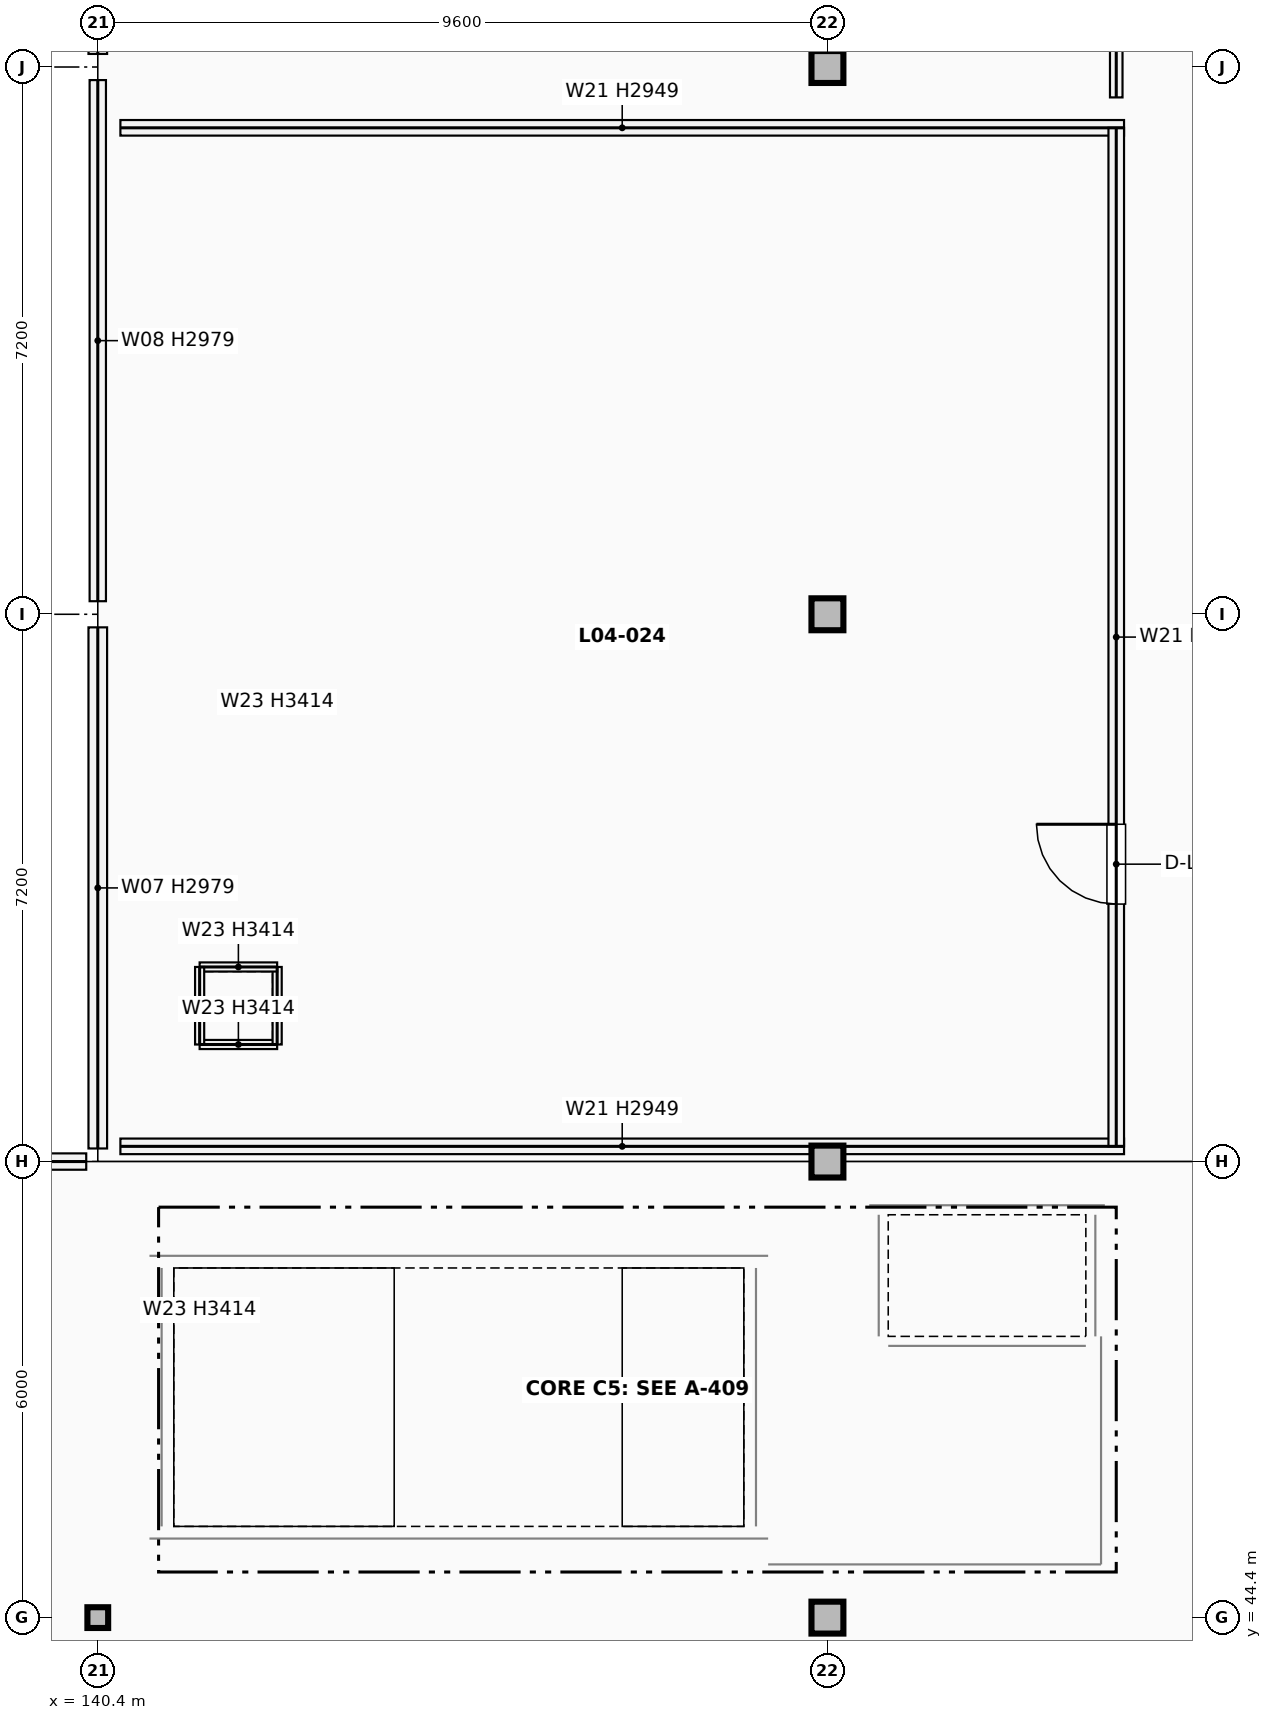
"""IFC4 building model, lengths in metres.
Left out: names, types, materials, properties, quantities, classifications, styles, units other than length and angle.
Written with IfcOpenShell. Run it as: python <this file> out.ifc"""

import sys

from ifc_helpers import new_model, si_unit, direction, frame, frame_2d, origin, origin_2d, place, context, subcontext, project, spatial, rectangle, hollow_circle, extrude, element, fill, save


model = new_model("IFC4")
c1 = context("Model", 3, precision=1e-05, world=origin(), true_north=direction((0.0, 1.0)))
c2 = subcontext(c1, "Body", "Model", "MODEL_VIEW")
j1 = project(units=[si_unit("LENGTHUNIT", "METRE"), si_unit("PLANEANGLEUNIT", "RADIAN")], contexts=[c1])
p1 = place(None, origin())
s1 = spatial("IfcSite", under=j1, at=p1, CompositionType="ELEMENT")
p2 = place(p1, origin())
s2 = spatial("IfcBuilding", under=s1, at=p2, CompositionType="ELEMENT")
p3 = place(p2, frame((0.0, 0.0, 17.34)))
s3 = spatial("IfcBuildingStorey", under=s2, at=p3, CompositionType="ELEMENT", Elevation=17.34)
p4 = place(p3, frame((140.4, 44.4, 0.0), z_axis=(0.0, 0.0, 1.0), x_axis=(1.0, 0.0, 0.0)))
e1 = element("IfcColumn", 1, at=p4, inside=s3, PredefinedType="COLUMN", context=c2, shape_type="SweptSolid", body=[
    extrude(hollow_circle(Radius=0.136, WallThickness=0.012, at=origin_2d()), origin(), (0.0, 0.0, 1.0), 3.7),
])
for number, where, z_axis, x_axis in (
    (2, (150.0, 44.4, 0.0), (0.0, 0.0, 1.0), (1.0, 0.0, 0.0)),
    (3, (150.0, 50.4, 0.0), (0.0, 0.0, 1.0), (1.0, 0.0, 0.0)),
    (4, (150.0, 57.6, 0.0), (0.0, 0.0, 1.0), (1.0, 0.0, 0.0)),
    (5, (150.0, 64.8, 0.0), (0.0, 0.0, 1.0), (1.0, 0.0, 0.0)),
):
    element("IfcColumn", number, at=place(p3, frame(where, z_axis=z_axis, x_axis=x_axis)), inside=s3, PredefinedType="COLUMN", context=c2, shape_type="SweptSolid", body=[
        extrude(rectangle(XDim=0.42, YDim=0.42, at=origin_2d()), origin(), (0.0, 0.0, 1.0), 3.74),
    ])
p5 = place(p3, frame((131.012, 50.4, 0.0), z_axis=(0.0, 0.0, 1.0), x_axis=(1.0, 0.0, 0.0)))
e6 = element("IfcWall", 6, at=p5, inside=s3, PredefinedType="SOLIDWALL", context=c2, shape_type="SweptSolid", body=[
    extrude(rectangle(XDim=9.236, YDim=0.215, at=frame_2d((4.618, 0.0))), origin(), (0.0, 0.0, 1.0), 2.979),
])
p6 = place(p5, frame((1.967, 0.0, 0.75)))
e7 = element("IfcOpeningElement", 7, at=p6, cuts=e6, PredefinedType="OPENING", context=c2, shape_type="SweptSolid", body=[
    extrude(rectangle(XDim=0.75, YDim=2.1, at=frame_2d((0.375, 1.05))), frame((0.0, 0.118, 0.0), z_axis=(0.0, -1.0, 0.0), x_axis=(1.0, 0.0, 0.0)), (0.0, 0.0, 1.0), 0.235),
])
p7 = place(p5, frame((4.243, 0.0, 0.75)))
e8 = element("IfcOpeningElement", 8, at=p7, cuts=e6, PredefinedType="OPENING", context=c2, shape_type="SweptSolid", body=[
    extrude(rectangle(XDim=0.75, YDim=2.1, at=frame_2d((0.375, 1.05))), frame((0.0, 0.118, 0.0), z_axis=(0.0, -1.0, 0.0), x_axis=(1.0, 0.0, 0.0)), (0.0, 0.0, 1.0), 0.235),
])
p8 = place(p5, frame((6.52, 0.0, 0.75)))
e9 = element("IfcOpeningElement", 9, at=p8, cuts=e6, PredefinedType="OPENING", context=c2, shape_type="SweptSolid", body=[
    extrude(rectangle(XDim=0.75, YDim=2.1, at=frame_2d((0.375, 1.05))), frame((0.0, 0.118, 0.0), z_axis=(0.0, -1.0, 0.0), x_axis=(1.0, 0.0, 0.0)), (0.0, 0.0, 1.0), 0.235),
])
p9 = place(p3, frame((140.4, 50.572, 0.0), z_axis=(0.0, 0.0, 1.0), x_axis=(0.0, 1.0, 0.0)))
e10 = element("IfcWall", 10, at=p9, inside=s3, PredefinedType="SOLIDWALL", context=c2, shape_type="SweptSolid", body=[
    extrude(rectangle(XDim=6.856, YDim=0.245, at=frame_2d((3.428, 0.0))), origin(), (0.0, 0.0, 1.0), 2.979),
])
p10 = place(p3, frame((140.4, 57.772, 0.0), z_axis=(0.0, 0.0, 1.0), x_axis=(0.0, 1.0, 0.0)))
e11 = element("IfcWall", 11, at=p10, inside=s3, PredefinedType="SOLIDWALL", context=c2, shape_type="SweptSolid", body=[
    extrude(rectangle(XDim=6.856, YDim=0.215, at=frame_2d((3.428, 0.0))), origin(), (0.0, 0.0, 1.0), 2.979),
])
p11 = place(p3, frame((140.4, 64.972, 0.0), z_axis=(0.0, 0.0, 1.0), x_axis=(0.0, 1.0, 0.0)))
e12 = element("IfcWall", 12, at=p11, inside=s3, PredefinedType="SOLIDWALL", context=c2, shape_type="SweptSolid", body=[
    extrude(rectangle(XDim=6.856, YDim=0.245, at=frame_2d((3.428, 0.0))), origin(), (0.0, 0.0, 1.0), 2.979),
])
for number, where, z_axis, x_axis in (
    (13, (141.74, 51.94, 0.0), (0.0, 0.0, 1.0), (1.0, 0.0, 0.0)),
    (14, (142.76, 51.94, 0.0), (0.0, 0.0, 1.0), (0.0, 1.0, 0.0)),
    (15, (142.76, 52.96, 0.0), (0.0, 0.0, 1.0), (-1.0, 0.0, 0.0)),
    (16, (141.74, 52.96, 0.0), (0.0, 0.0, 1.0), (0.0, -1.0, 0.0)),
):
    element("IfcWall", number, at=place(p3, frame(where, z_axis=z_axis, x_axis=x_axis)), inside=s3, PredefinedType="PARTITIONING", context=c2, shape_type="SweptSolid", body=[
        extrude(rectangle(XDim=1.02, YDim=0.12, at=frame_2d((0.51, 0.0))), origin(), (0.0, 0.0, 1.0), 3.414),
    ])
p12 = place(p3, frame((141.24, 45.6, 0.0), z_axis=(0.0, 0.0, 1.0), x_axis=(0.0, 1.0, 0.0)))
e17 = element("IfcWall", 17, at=p12, inside=s3, PredefinedType="SHEAR", context=c2, shape_type="SweptSolid", body=[
    extrude(rectangle(XDim=3.4, YDim=0.32, at=frame_2d((1.7, 0.0))), origin(), (0.0, 0.0, 1.0), 3.74),
])
for number, where, z_axis, x_axis in (
    (18, (141.08, 45.44, 0.0), (0.0, 0.0, 1.0), (1.0, 0.0, 0.0)),
    (19, (141.08, 49.16, 0.0), (0.0, 0.0, 1.0), (1.0, 0.0, 0.0)),
):
    element("IfcWall", number, at=place(p3, frame(where, z_axis=z_axis, x_axis=x_axis)), inside=s3, PredefinedType="SHEAR", context=c2, shape_type="SweptSolid", body=[
        extrude(rectangle(XDim=8.14, YDim=0.32, at=frame_2d((4.07, 0.0))), origin(), (0.0, 0.0, 1.0), 3.74),
    ])
p13 = place(p3, frame((149.06, 45.6, 0.0), z_axis=(0.0, 0.0, 1.0), x_axis=(0.0, 1.0, 0.0)))
e20 = element("IfcWall", 20, at=p13, inside=s3, PredefinedType="SHEAR", context=c2, shape_type="SweptSolid", body=[
    extrude(rectangle(XDim=3.4, YDim=0.32, at=frame_2d((1.7, 0.0))), origin(), (0.0, 0.0, 1.0), 3.74),
])
p14 = place(p13, frame((0.65, 0.0, 0.0)))
e21 = element("IfcOpeningElement", 21, at=p14, cuts=e20, PredefinedType="OPENING", context=c2, shape_type="SweptSolid", body=[
    extrude(rectangle(XDim=1.2, YDim=2.2, at=frame_2d((0.6, 1.1))), frame((0.0, 0.17, 0.0), z_axis=(0.0, -1.0, 0.0), x_axis=(1.0, 0.0, 0.0)), (0.0, 0.0, 1.0), 0.34),
])
for number, where, z_axis, x_axis in (
    (22, (150.675, 48.1, 0.0), (0.0, 0.0, 1.0), (0.0, 1.0, 0.0)),
    (23, (153.525, 48.1, 0.0), (0.0, 0.0, 1.0), (0.0, 1.0, 0.0)),
):
    element("IfcWall", number, at=place(p3, frame(where, z_axis=z_axis, x_axis=x_axis)), inside=s3, PredefinedType="SHEAR", context=c2, shape_type="SweptSolid", body=[
        extrude(rectangle(XDim=1.6, YDim=0.25, at=frame_2d((0.8, 0.0))), origin(), (0.0, 0.0, 1.0), 3.74),
    ])
p15 = place(p3, frame((150.55, 49.825, 0.0), z_axis=(0.0, 0.0, 1.0), x_axis=(1.0, 0.0, 0.0)))
e24 = element("IfcWall", 24, at=p15, inside=s3, PredefinedType="SHEAR", context=c2, shape_type="SweptSolid", body=[
    extrude(rectangle(XDim=3.1, YDim=0.25, at=frame_2d((1.55, 0.0))), origin(), (0.0, 0.0, 1.0), 3.74),
])
p16 = place(p3, frame((150.8, 47.975, 0.0), z_axis=(0.0, 0.0, 1.0), x_axis=(1.0, 0.0, 0.0)))
e25 = element("IfcWall", 25, at=p16, inside=s3, PredefinedType="SHEAR", context=c2, shape_type="SweptSolid", body=[
    extrude(rectangle(XDim=2.6, YDim=0.25, at=frame_2d((1.3, 0.0))), origin(), (0.0, 0.0, 1.0), 3.74),
])
p17 = place(p16, frame((0.75, 0.0, 0.0)))
e26 = element("IfcOpeningElement", 26, at=p17, cuts=e25, PredefinedType="OPENING", context=c2, shape_type="SweptSolid", body=[
    extrude(rectangle(XDim=1.1, YDim=2.15, at=frame_2d((0.55, 1.075))), frame((0.0, 0.135, 0.0), z_axis=(0.0, -1.0, 0.0), x_axis=(1.0, 0.0, 0.0)), (0.0, 0.0, 1.0), 0.27),
])
p18 = place(p3, frame((153.6, 45.1, 0.0), z_axis=(0.0, 0.0, 1.0), x_axis=(0.0, 1.0, 0.0)))
e27 = element("IfcWall", 27, at=p18, inside=s3, PredefinedType="PARTITIONING", context=c2, shape_type="SweptSolid", body=[
    extrude(rectangle(XDim=3.0, YDim=0.2, at=frame_2d((1.5, 0.0))), origin(), (0.0, 0.0, 1.0), 2.949),
])
p19 = place(p18, frame((0.775, 0.0, 0.0)))
e28 = element("IfcOpeningElement", 28, at=p19, cuts=e27, PredefinedType="OPENING", context=c2, shape_type="SweptSolid", body=[
    extrude(rectangle(XDim=1.45, YDim=2.2, at=frame_2d((0.725, 1.1))), frame((0.0, 0.11, 0.0), z_axis=(0.0, -1.0, 0.0), x_axis=(1.0, 0.0, 0.0)), (0.0, 0.0, 1.0), 0.22),
])
p20 = place(p3, frame((149.22, 45.1, 0.0), z_axis=(0.0, 0.0, 1.0), x_axis=(1.0, 0.0, 0.0)))
e29 = element("IfcWall", 29, at=p20, inside=s3, PredefinedType="PARTITIONING", context=c2, shape_type="SweptSolid", body=[
    extrude(rectangle(XDim=4.38, YDim=0.2, at=frame_2d((2.19, 0.0))), origin(), (0.0, 0.0, 1.0), 2.949),
])
for number, where, z_axis, x_axis in (
    (30, (140.698, 50.6, 0.0), (0.0, 0.0, 1.0), (1.0, 0.0, 0.0)),
    (31, (140.698, 64.0, 0.0), (0.0, 0.0, 1.0), (1.0, 0.0, 0.0)),
):
    element("IfcWall", number, at=place(p3, frame(where, z_axis=z_axis, x_axis=x_axis)), inside=s3, PredefinedType="PARTITIONING", context=c2, shape_type="SweptSolid", body=[
        extrude(rectangle(XDim=13.205, YDim=0.205, at=frame_2d((6.603, 0.0))), origin(), (0.0, 0.0, 1.0), 2.949),
    ])
p21 = place(p3, frame((153.8, 50.6, 0.0), z_axis=(0.0, 0.0, 1.0), x_axis=(0.0, 1.0, 0.0)))
e32 = element("IfcWall", 32, at=p21, inside=s3, PredefinedType="PARTITIONING", context=c2, shape_type="SweptSolid", body=[
    extrude(rectangle(XDim=13.4, YDim=0.205, at=frame_2d((6.7, 0.0))), origin(), (0.0, 0.0, 1.0), 3.029),
])
p22 = place(p21, frame((3.188, 0.0, 0.0)))
e33 = element("IfcOpeningElement", 33, at=p22, cuts=e32, PredefinedType="OPENING", context=c2, shape_type="SweptSolid", body=[
    extrude(rectangle(XDim=1.05, YDim=2.15, at=frame_2d((0.525, 1.075))), frame((0.0, 0.113, 0.0), z_axis=(0.0, -1.0, 0.0), x_axis=(1.0, 0.0, 0.0)), (0.0, 0.0, 1.0), 0.225),
])
p23 = place(p3, frame((153.8, 64.4, 0.0), z_axis=(0.0, 0.0, 1.0), x_axis=(0.0, 1.0, 0.0)))
e34 = element("IfcWall", 34, at=p23, inside=s3, PredefinedType="PARTITIONING", context=c2, shape_type="SweptSolid", body=[
    extrude(rectangle(XDim=14.6, YDim=0.165, at=frame_2d((7.3, 0.0))), origin(), (0.0, 0.0, 1.0), 3.029),
])
p24 = place(p23, frame((3.345, 0.0, 0.0)))
e35 = element("IfcOpeningElement", 35, at=p24, cuts=e34, PredefinedType="OPENING", context=c2, shape_type="SweptSolid", body=[
    extrude(rectangle(XDim=1.62, YDim=2.32, at=frame_2d((0.81, 1.16))), frame((0.0, 0.093, 0.0), z_axis=(0.0, -1.0, 0.0), x_axis=(1.0, 0.0, 0.0)), (0.0, 0.0, 1.0), 0.185),
])
p25 = place(p14, origin())
e36 = element("IfcDoor", 36, at=p25, inside=s3, OperationType="SINGLE_SWING_RIGHT", PredefinedType="DOOR", context=c2, shape_type="SweptSolid", body=[
    extrude(rectangle(XDim=1.2, YDim=2.2, at=frame_2d((0.6, 1.1))), frame((0.0, 0.025, 0.0), z_axis=(0.0, -1.0, 0.0), x_axis=(1.0, 0.0, 0.0)), (0.0, 0.0, 1.0), 0.05),
])
fill(e21, e36)
p26 = place(p17, origin())
e37 = element("IfcDoor", 37, at=p26, inside=s3, OperationType="DOUBLE_DOOR_SLIDING", PredefinedType="DOOR", context=c2, shape_type="SweptSolid", body=[
    extrude(rectangle(XDim=1.1, YDim=2.15, at=frame_2d((0.55, 1.075))), frame((0.0, 0.025, 0.0), z_axis=(0.0, -1.0, 0.0), x_axis=(1.0, 0.0, 0.0)), (0.0, 0.0, 1.0), 0.05),
])
fill(e26, e37)
p27 = place(p19, frame((1.45, 0.0, 0.0), z_axis=(0.0, 0.0, 1.0), x_axis=(-1.0, 0.0, 0.0)))
e38 = element("IfcDoor", 38, at=p27, inside=s3, OperationType="DOUBLE_DOOR_SINGLE_SWING", PredefinedType="DOOR", context=c2, shape_type="SweptSolid", body=[
    extrude(rectangle(XDim=1.45, YDim=2.2, at=frame_2d((0.725, 1.1))), frame((0.0, 0.025, 0.0), z_axis=(0.0, -1.0, 0.0), x_axis=(1.0, 0.0, 0.0)), (0.0, 0.0, 1.0), 0.05),
])
fill(e28, e38)
p28 = place(p22, origin())
e39 = element("IfcDoor", 39, at=p28, inside=s3, OperationType="SINGLE_SWING_RIGHT", PredefinedType="DOOR", context=c2, shape_type="SweptSolid", body=[
    extrude(rectangle(XDim=1.05, YDim=2.15, at=frame_2d((0.525, 1.075))), frame((0.0, 0.025, 0.0), z_axis=(0.0, -1.0, 0.0), x_axis=(1.0, 0.0, 0.0)), (0.0, 0.0, 1.0), 0.05),
])
fill(e33, e39)
save(model, sys.argv[1])
